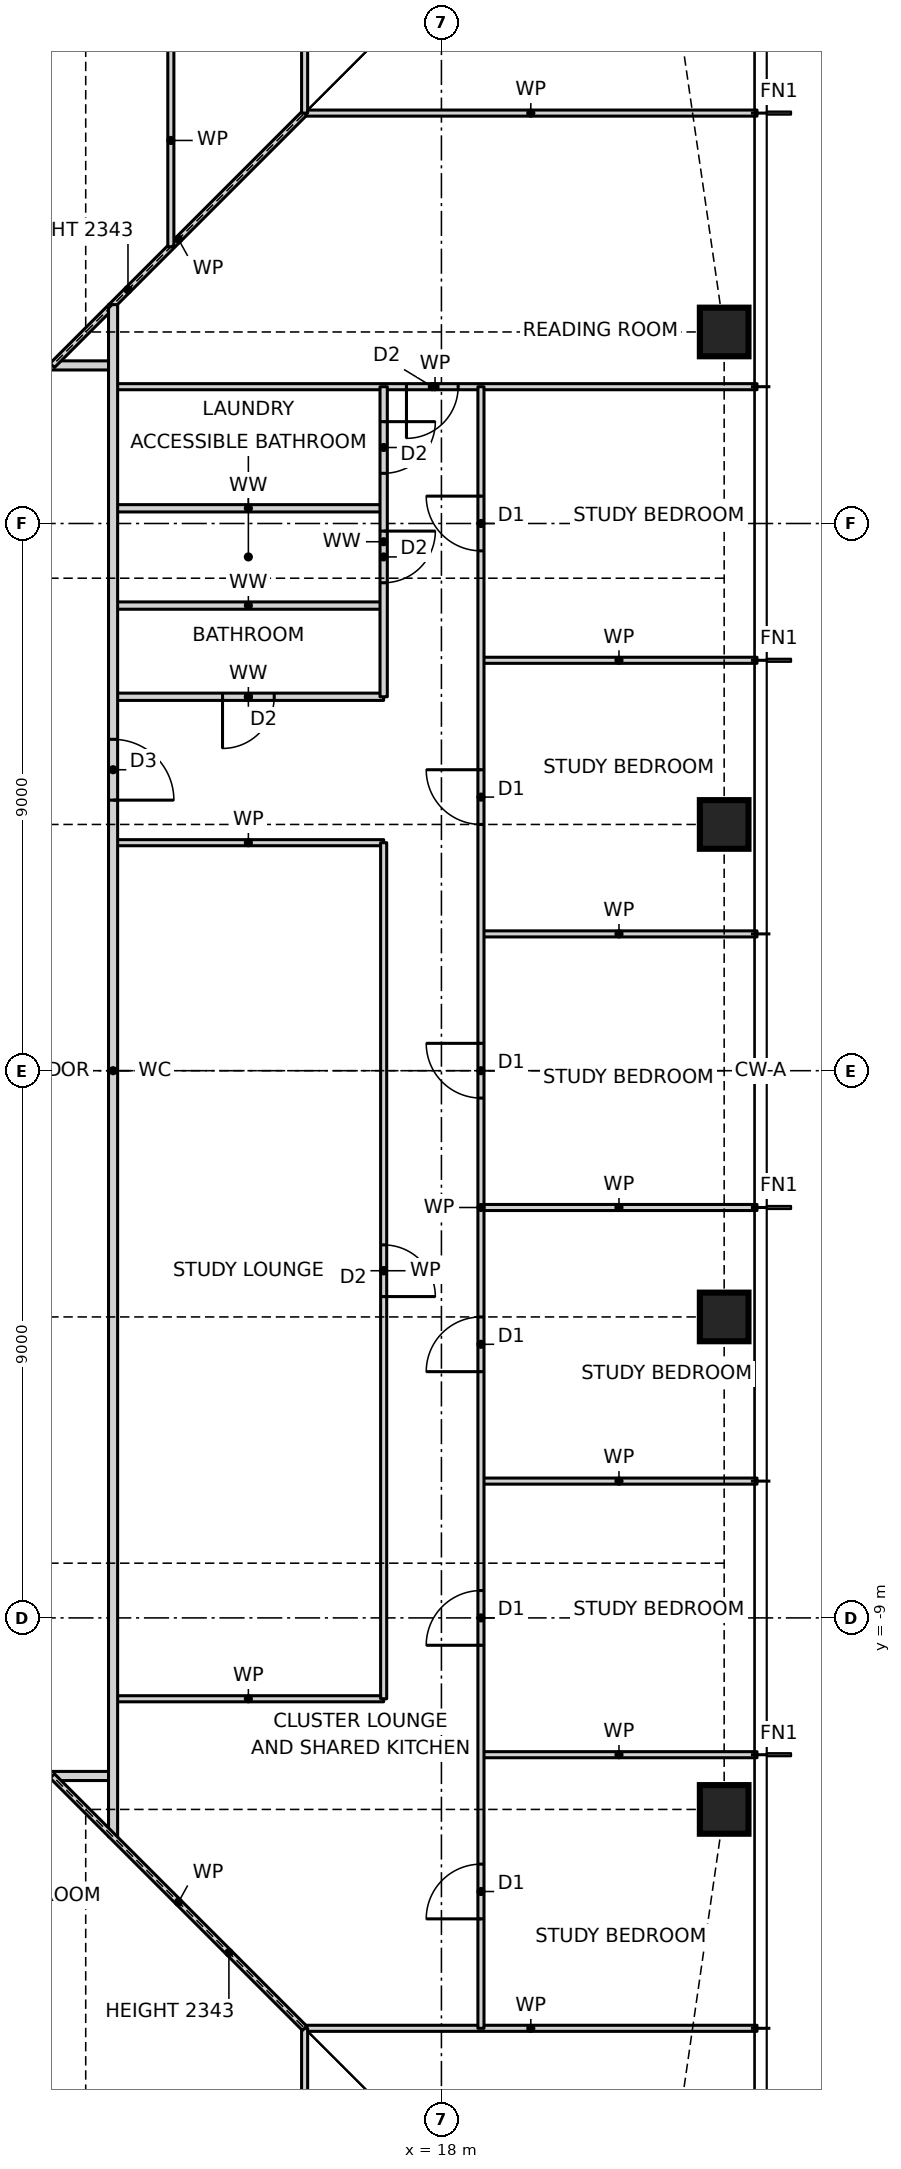
"""IFC4 building model, lengths in metres.
Left out: names, types, materials, properties, quantities, classifications, styles, units other than length and angle.
Written with IfcOpenShell. Run it as: python <this file> out.ifc"""

import sys

from ifc_helpers import new_model, si_unit, direction, frame, frame_2d, origin, origin_2d, place, context, subcontext, project, spatial, rectangle, hollow_rectangle, extrude, element, fill, save


model = new_model("IFC4")
c1 = context("Model", 3, precision=1e-05, world=origin(), true_north=direction((0.0, 1.0)))
c2 = subcontext(c1, "Body", "Model", "MODEL_VIEW")
j1 = project(units=[si_unit("LENGTHUNIT", "METRE"), si_unit("PLANEANGLEUNIT", "RADIAN")], contexts=[c1])
p1 = place(None, origin())
s1 = spatial("IfcSite", under=j1, at=p1, CompositionType="ELEMENT")
p2 = place(p1, origin())
s2 = spatial("IfcBuilding", under=s1, at=p2, CompositionType="ELEMENT")
p3 = place(p2, frame((0.0, 0.0, 67.5)))
s3 = spatial("IfcBuildingStorey", under=s2, at=p3, CompositionType="ELEMENT", Elevation=67.5)
for number, where, z_axis, x_axis in (
    (1, (22.65, -12.15, 0.0), (0.0, 0.0, 1.0), (1.0, 0.0, 0.0)),
    (2, (22.65, -4.05, 0.0), (0.0, 0.0, 1.0), (1.0, 0.0, 0.0)),
    (3, (22.65, 4.05, 0.0), (0.0, 0.0, 1.0), (1.0, 0.0, 0.0)),
    (4, (22.65, 12.15, 0.0), (0.0, 0.0, 1.0), (1.0, 0.0, 0.0)),
):
    element("IfcColumn", number, at=place(p3, frame(where, z_axis=z_axis, x_axis=x_axis)), inside=s3, PredefinedType="COLUMN", context=c2, shape_type="SweptSolid", body=[
        extrude(hollow_rectangle(XDim=0.8, YDim=0.8, WallThickness=0.09, at=origin_2d()), origin(), (0.0, 0.0, 1.0), 3.5),
    ])
p4 = place(p3, frame((15.75, -15.75, 0.0), z_axis=(0.0, 0.0, 1.0), x_axis=(1.0, 0.0, 0.0)))
e5 = element("IfcWall", 5, at=p4, inside=s3, PredefinedType="PARTITIONING", context=c2, shape_type="SweptSolid", body=[
    extrude(rectangle(XDim=7.44, YDim=0.1, at=frame_2d((3.72, 0.0))), origin(), (0.0, 0.0, 1.0), 3.27),
])
p5 = place(p3, frame((-11.6, -11.6, 0.0), z_axis=(0.0, 0.0, 1.0), x_axis=(1.0, 0.0, 0.0)))
e6 = element("IfcWall", 6, at=p5, inside=s3, PredefinedType="PARTITIONING", context=c2, shape_type="SweptSolid", body=[
    extrude(rectangle(XDim=24.2, YDim=0.15, at=frame_2d((12.1, 0.0))), origin(), (0.0, 0.0, 1.0), 3.27),
])
p6 = place(p5, frame((0.74, 0.0, 0.0)))
e7 = element("IfcOpeningElement", 7, at=p6, cuts=e6, PredefinedType="OPENING", context=c2, shape_type="SweptSolid", body=[
    extrude(rectangle(XDim=1.0, YDim=2.1, at=frame_2d((0.5, 1.05))), frame((0.0, 0.085, 0.0), z_axis=(0.0, -1.0, 0.0), x_axis=(1.0, 0.0, 0.0)), (0.0, 0.0, 1.0), 0.17),
])
p7 = place(p5, frame((21.025, 0.0, 0.0)))
e8 = element("IfcOpeningElement", 8, at=p7, cuts=e6, PredefinedType="OPENING", context=c2, shape_type="SweptSolid", body=[
    extrude(rectangle(XDim=1.0, YDim=2.1, at=frame_2d((0.5, 1.05))), frame((0.0, 0.085, 0.0), z_axis=(0.0, -1.0, 0.0), x_axis=(1.0, 0.0, 0.0)), (0.0, 0.0, 1.0), 0.17),
])
p8 = place(p3, frame((18.65, -11.25, 0.0), z_axis=(0.0, 0.0, 1.0), x_axis=(1.0, 0.0, 0.0)))
e9 = element("IfcWall", 9, at=p8, inside=s3, PredefinedType="PARTITIONING", context=c2, shape_type="SweptSolid", body=[
    extrude(rectangle(XDim=4.54, YDim=0.1, at=frame_2d((2.27, 0.0))), origin(), (0.0, 0.0, 1.0), 3.27),
])
p9 = place(p3, frame((12.6, -10.33, 0.0), z_axis=(0.0, 0.0, 1.0), x_axis=(1.0, 0.0, 0.0)))
e10 = element("IfcWall", 10, at=p9, inside=s3, PredefinedType="PARTITIONING", context=c2, shape_type="SweptSolid", body=[
    extrude(rectangle(XDim=4.45, YDim=0.1, at=frame_2d((2.225, 0.0))), origin(), (0.0, 0.0, 1.0), 3.27),
])
for number, where, z_axis, x_axis in (
    (11, (18.65, -6.75, 0.0), (0.0, 0.0, 1.0), (1.0, 0.0, 0.0)),
    (12, (18.65, -2.25, 0.0), (0.0, 0.0, 1.0), (1.0, 0.0, 0.0)),
    (13, (18.65, 2.25, 0.0), (0.0, 0.0, 1.0), (1.0, 0.0, 0.0)),
):
    element("IfcWall", number, at=place(p3, frame(where, z_axis=z_axis, x_axis=x_axis)), inside=s3, PredefinedType="PARTITIONING", context=c2, shape_type="SweptSolid", body=[
        extrude(rectangle(XDim=4.54, YDim=0.1, at=frame_2d((2.27, 0.0))), origin(), (0.0, 0.0, 1.0), 3.27),
    ])
p10 = place(p3, frame((12.6, 3.75, 0.0), z_axis=(0.0, 0.0, 1.0), x_axis=(1.0, 0.0, 0.0)))
e14 = element("IfcWall", 14, at=p10, inside=s3, PredefinedType="PARTITIONING", context=c2, shape_type="SweptSolid", body=[
    extrude(rectangle(XDim=4.45, YDim=0.1, at=frame_2d((2.225, 0.0))), origin(), (0.0, 0.0, 1.0), 3.27),
])
p11 = place(p3, frame((12.6, 6.15, 0.0), z_axis=(0.0, 0.0, 1.0), x_axis=(1.0, 0.0, 0.0)))
e15 = element("IfcWall", 15, at=p11, inside=s3, PredefinedType="PARTITIONING", context=c2, shape_type="SweptSolid", body=[
    extrude(rectangle(XDim=4.45, YDim=0.12, at=frame_2d((2.225, 0.0))), origin(), (0.0, 0.0, 1.0), 3.27),
])
p12 = place(p11, frame((1.8, 0.0, 0.0)))
e16 = element("IfcOpeningElement", 16, at=p12, cuts=e15, PredefinedType="OPENING", context=c2, shape_type="SweptSolid", body=[
    extrude(rectangle(XDim=0.85, YDim=2.1, at=frame_2d((0.425, 1.05))), frame((0.0, 0.07, 0.0), z_axis=(0.0, -1.0, 0.0), x_axis=(1.0, 0.0, 0.0)), (0.0, 0.0, 1.0), 0.14),
])
p13 = place(p3, frame((18.65, 6.75, 0.0), z_axis=(0.0, 0.0, 1.0), x_axis=(1.0, 0.0, 0.0)))
e17 = element("IfcWall", 17, at=p13, inside=s3, PredefinedType="PARTITIONING", context=c2, shape_type="SweptSolid", body=[
    extrude(rectangle(XDim=4.54, YDim=0.1, at=frame_2d((2.27, 0.0))), origin(), (0.0, 0.0, 1.0), 3.27),
])
for number, where, z_axis, x_axis in (
    (18, (12.6, 7.65, 0.0), (0.0, 0.0, 1.0), (1.0, 0.0, 0.0)),
    (19, (12.6, 9.25, 0.0), (0.0, 0.0, 1.0), (1.0, 0.0, 0.0)),
):
    element("IfcWall", number, at=place(p3, frame(where, z_axis=z_axis, x_axis=x_axis)), inside=s3, PredefinedType="PARTITIONING", context=c2, shape_type="SweptSolid", body=[
        extrude(rectangle(XDim=4.45, YDim=0.12, at=frame_2d((2.225, 0.0))), origin(), (0.0, 0.0, 1.0), 3.27),
    ])
p14 = place(p3, frame((12.6, 11.25, 0.0), z_axis=(0.0, 0.0, 1.0), x_axis=(1.0, 0.0, 0.0)))
e20 = element("IfcWall", 20, at=p14, inside=s3, PredefinedType="PARTITIONING", context=c2, shape_type="SweptSolid", body=[
    extrude(rectangle(XDim=10.59, YDim=0.1, at=frame_2d((5.295, 0.0))), origin(), (0.0, 0.0, 1.0), 3.27),
])
p15 = place(p14, frame((4.825, 0.0, 0.0)))
e21 = element("IfcOpeningElement", 21, at=p15, cuts=e20, PredefinedType="OPENING", context=c2, shape_type="SweptSolid", body=[
    extrude(rectangle(XDim=0.85, YDim=2.1, at=frame_2d((0.425, 1.05))), frame((0.0, 0.06, 0.0), z_axis=(0.0, -1.0, 0.0), x_axis=(1.0, 0.0, 0.0)), (0.0, 0.0, 1.0), 0.12),
])
p16 = place(p3, frame((-11.6, 11.6, 0.0), z_axis=(0.0, 0.0, 1.0), x_axis=(1.0, 0.0, 0.0)))
e22 = element("IfcWall", 22, at=p16, inside=s3, PredefinedType="PARTITIONING", context=c2, shape_type="SweptSolid", body=[
    extrude(rectangle(XDim=24.2, YDim=0.15, at=frame_2d((12.1, 0.0))), origin(), (0.0, 0.0, 1.0), 3.27),
])
p17 = place(p16, frame((7.95, 0.0, 0.0)))
e23 = element("IfcOpeningElement", 23, at=p17, cuts=e22, PredefinedType="OPENING", context=c2, shape_type="SweptSolid", body=[
    extrude(rectangle(XDim=1.0, YDim=2.1, at=frame_2d((0.5, 1.05))), frame((0.0, 0.085, 0.0), z_axis=(0.0, -1.0, 0.0), x_axis=(1.0, 0.0, 0.0)), (0.0, 0.0, 1.0), 0.17),
])
p18 = place(p16, frame((5.9, 0.0, 0.0)))
e24 = element("IfcOpeningElement", 24, at=p18, cuts=e22, PredefinedType="OPENING", context=c2, shape_type="SweptSolid", body=[
    extrude(rectangle(XDim=0.9, YDim=2.1, at=frame_2d((0.45, 1.05))), frame((0.0, 0.085, 0.0), z_axis=(0.0, -1.0, 0.0), x_axis=(1.0, 0.0, 0.0)), (0.0, 0.0, 1.0), 0.17),
])
p19 = place(p3, frame((15.75, 15.75, 0.0), z_axis=(0.0, 0.0, 1.0), x_axis=(1.0, 0.0, 0.0)))
e25 = element("IfcWall", 25, at=p19, inside=s3, PredefinedType="PARTITIONING", context=c2, shape_type="SweptSolid", body=[
    extrude(rectangle(XDim=7.44, YDim=0.1, at=frame_2d((3.72, 0.0))), origin(), (0.0, 0.0, 1.0), 3.27),
])
p20 = place(p3, frame((11.6, 11.6, 0.0), z_axis=(0.0, 0.0, 1.0), x_axis=(0.707106781187, 0.707106781187, 0.0)))
e26 = element("IfcWall", 26, at=p20, inside=s3, PredefinedType="PARTITIONING", context=c2, shape_type="SweptSolid", body=[
    extrude(rectangle(XDim=5.869, YDim=0.1, at=frame_2d((2.935, 0.0))), origin(), (0.0, 0.0, 1.0), 2.343),
])
p21 = place(p3, frame((18.65, -15.75, 0.0), z_axis=(0.0, 0.0, 1.0), x_axis=(0.0, 1.0, 0.0)))
e27 = element("IfcWall", 27, at=p21, inside=s3, PredefinedType="PARTITIONING", context=c2, shape_type="SweptSolid", body=[
    extrude(rectangle(XDim=27.0, YDim=0.1, at=frame_2d((13.5, 0.0))), origin(), (0.0, 0.0, 1.0), 3.27),
])
p22 = place(p21, frame((1.8, 0.0, 0.0)))
e28 = element("IfcOpeningElement", 28, at=p22, cuts=e27, PredefinedType="OPENING", context=c2, shape_type="SweptSolid", body=[
    extrude(rectangle(XDim=0.9, YDim=2.1, at=frame_2d((0.45, 1.05))), frame((0.0, 0.06, 0.0), z_axis=(0.0, -1.0, 0.0), x_axis=(1.0, 0.0, 0.0)), (0.0, 0.0, 1.0), 0.12),
])
p23 = place(p21, frame((6.3, 0.0, 0.0)))
e29 = element("IfcOpeningElement", 29, at=p23, cuts=e27, PredefinedType="OPENING", context=c2, shape_type="SweptSolid", body=[
    extrude(rectangle(XDim=0.9, YDim=2.1, at=frame_2d((0.45, 1.05))), frame((0.0, 0.06, 0.0), z_axis=(0.0, -1.0, 0.0), x_axis=(1.0, 0.0, 0.0)), (0.0, 0.0, 1.0), 0.12),
])
p24 = place(p21, frame((10.8, 0.0, 0.0)))
e30 = element("IfcOpeningElement", 30, at=p24, cuts=e27, PredefinedType="OPENING", context=c2, shape_type="SweptSolid", body=[
    extrude(rectangle(XDim=0.9, YDim=2.1, at=frame_2d((0.45, 1.05))), frame((0.0, 0.06, 0.0), z_axis=(0.0, -1.0, 0.0), x_axis=(1.0, 0.0, 0.0)), (0.0, 0.0, 1.0), 0.12),
])
p25 = place(p21, frame((15.3, 0.0, 0.0)))
e31 = element("IfcOpeningElement", 31, at=p25, cuts=e27, PredefinedType="OPENING", context=c2, shape_type="SweptSolid", body=[
    extrude(rectangle(XDim=0.9, YDim=2.1, at=frame_2d((0.45, 1.05))), frame((0.0, 0.06, 0.0), z_axis=(0.0, -1.0, 0.0), x_axis=(1.0, 0.0, 0.0)), (0.0, 0.0, 1.0), 0.12),
])
p26 = place(p21, frame((19.8, 0.0, 0.0)))
e32 = element("IfcOpeningElement", 32, at=p26, cuts=e27, PredefinedType="OPENING", context=c2, shape_type="SweptSolid", body=[
    extrude(rectangle(XDim=0.9, YDim=2.1, at=frame_2d((0.45, 1.05))), frame((0.0, 0.06, 0.0), z_axis=(0.0, -1.0, 0.0), x_axis=(1.0, 0.0, 0.0)), (0.0, 0.0, 1.0), 0.12),
])
p27 = place(p21, frame((24.3, 0.0, 0.0)))
e33 = element("IfcOpeningElement", 33, at=p27, cuts=e27, PredefinedType="OPENING", context=c2, shape_type="SweptSolid", body=[
    extrude(rectangle(XDim=0.9, YDim=2.1, at=frame_2d((0.45, 1.05))), frame((0.0, 0.06, 0.0), z_axis=(0.0, -1.0, 0.0), x_axis=(1.0, 0.0, 0.0)), (0.0, 0.0, 1.0), 0.12),
])
p28 = place(p3, frame((17.05, -10.33, 0.0), z_axis=(0.0, 0.0, 1.0), x_axis=(0.0, 1.0, 0.0)))
e34 = element("IfcWall", 34, at=p28, inside=s3, PredefinedType="PARTITIONING", context=c2, shape_type="SweptSolid", body=[
    extrude(rectangle(XDim=14.08, YDim=0.1, at=frame_2d((7.04, 0.0))), origin(), (0.0, 0.0, 1.0), 3.27),
])
p29 = place(p28, frame((6.615, 0.0, 0.0)))
e35 = element("IfcOpeningElement", 35, at=p29, cuts=e34, PredefinedType="OPENING", context=c2, shape_type="SweptSolid", body=[
    extrude(rectangle(XDim=0.85, YDim=2.1, at=frame_2d((0.425, 1.05))), frame((0.0, 0.06, 0.0), z_axis=(0.0, -1.0, 0.0), x_axis=(1.0, 0.0, 0.0)), (0.0, 0.0, 1.0), 0.12),
])
p30 = place(p3, frame((17.05, 6.15, 0.0), z_axis=(0.0, 0.0, 1.0), x_axis=(0.0, 1.0, 0.0)))
e36 = element("IfcWall", 36, at=p30, inside=s3, PredefinedType="PARTITIONING", context=c2, shape_type="SweptSolid", body=[
    extrude(rectangle(XDim=5.1, YDim=0.12, at=frame_2d((2.55, 0.0))), origin(), (0.0, 0.0, 1.0), 3.27),
])
p31 = place(p30, frame((1.875, 0.0, 0.0)))
e37 = element("IfcOpeningElement", 37, at=p31, cuts=e36, PredefinedType="OPENING", context=c2, shape_type="SweptSolid", body=[
    extrude(rectangle(XDim=0.85, YDim=2.1, at=frame_2d((0.425, 1.05))), frame((0.0, 0.07, 0.0), z_axis=(0.0, -1.0, 0.0), x_axis=(1.0, 0.0, 0.0)), (0.0, 0.0, 1.0), 0.14),
])
p32 = place(p30, frame((3.675, 0.0, 0.0)))
e38 = element("IfcOpeningElement", 38, at=p32, cuts=e36, PredefinedType="OPENING", context=c2, shape_type="SweptSolid", body=[
    extrude(rectangle(XDim=0.85, YDim=2.1, at=frame_2d((0.425, 1.05))), frame((0.0, 0.07, 0.0), z_axis=(0.0, -1.0, 0.0), x_axis=(1.0, 0.0, 0.0)), (0.0, 0.0, 1.0), 0.14),
])
p33 = place(p3, frame((15.75, -23.19, 0.0), z_axis=(0.0, 0.0, 1.0), x_axis=(0.0, 1.0, 0.0)))
e39 = element("IfcWall", 39, at=p33, inside=s3, PredefinedType="PARTITIONING", context=c2, shape_type="SweptSolid", body=[
    extrude(rectangle(XDim=7.44, YDim=0.1, at=frame_2d((3.72, 0.0))), origin(), (0.0, 0.0, 1.0), 3.27),
])
p34 = place(p33, frame((4.915, 0.0, 0.0)))
e40 = element("IfcOpeningElement", 40, at=p34, cuts=e39, PredefinedType="OPENING", context=c2, shape_type="SweptSolid", body=[
    extrude(rectangle(XDim=0.85, YDim=2.1, at=frame_2d((0.425, 1.05))), frame((0.0, 0.06, 0.0), z_axis=(0.0, -1.0, 0.0), x_axis=(1.0, 0.0, 0.0)), (0.0, 0.0, 1.0), 0.12),
])
p35 = place(p3, frame((15.75, 15.75, 0.0), z_axis=(0.0, 0.0, 1.0), x_axis=(0.0, 1.0, 0.0)))
e41 = element("IfcWall", 41, at=p35, inside=s3, PredefinedType="PARTITIONING", context=c2, shape_type="SweptSolid", body=[
    extrude(rectangle(XDim=7.44, YDim=0.1, at=frame_2d((3.72, 0.0))), origin(), (0.0, 0.0, 1.0), 3.27),
])
p36 = place(p35, frame((1.675, 0.0, 0.0)))
e42 = element("IfcOpeningElement", 42, at=p36, cuts=e41, PredefinedType="OPENING", context=c2, shape_type="SweptSolid", body=[
    extrude(rectangle(XDim=0.85, YDim=2.1, at=frame_2d((0.425, 1.05))), frame((0.0, 0.06, 0.0), z_axis=(0.0, -1.0, 0.0), x_axis=(1.0, 0.0, 0.0)), (0.0, 0.0, 1.0), 0.12),
])
p37 = place(p3, frame((13.55, 13.55, 0.0), z_axis=(0.0, 0.0, 1.0), x_axis=(0.0, 1.0, 0.0)))
e43 = element("IfcWall", 43, at=p37, inside=s3, PredefinedType="PARTITIONING", context=c2, shape_type="SweptSolid", body=[
    extrude(rectangle(XDim=3.5, YDim=0.1, at=frame_2d((1.75, 0.0))), origin(), (0.0, 0.0, 1.0), 3.27),
])
p38 = place(p3, frame((12.6, -12.6, 0.0), z_axis=(0.0, 0.0, 1.0), x_axis=(0.0, 1.0, 0.0)))
e44 = element("IfcWall", 44, at=p38, inside=s3, PredefinedType="PARTITIONING", context=c2, shape_type="SweptSolid", body=[
    extrude(rectangle(XDim=25.2, YDim=0.15, at=frame_2d((12.6, 0.0))), origin(), (0.0, 0.0, 1.0), 3.27),
])
p39 = place(p38, frame((17.05, 0.0, 0.0)))
e45 = element("IfcOpeningElement", 45, at=p39, cuts=e44, PredefinedType="OPENING", context=c2, shape_type="SweptSolid", body=[
    extrude(rectangle(XDim=1.0, YDim=2.1, at=frame_2d((0.5, 1.05))), frame((0.0, 0.085, 0.0), z_axis=(0.0, -1.0, 0.0), x_axis=(1.0, 0.0, 0.0)), (0.0, 0.0, 1.0), 0.17),
])
p40 = place(p3, frame((15.75, -15.75, 0.0), z_axis=(0.0, 0.0, 1.0), x_axis=(-0.707106781187, 0.707106781187, 0.0)))
e46 = element("IfcWall", 46, at=p40, inside=s3, PredefinedType="PARTITIONING", context=c2, shape_type="SweptSolid", body=[
    extrude(rectangle(XDim=5.869, YDim=0.1, at=frame_2d((2.935, 0.0))), origin(), (0.0, 0.0, 1.0), 2.343),
])
p41 = place(p22, origin())
e47 = element("IfcDoor", 47, at=p41, inside=s3, OperationType="SINGLE_SWING_LEFT", PredefinedType="DOOR", context=c2, shape_type="SweptSolid", body=[
    extrude(rectangle(XDim=0.9, YDim=2.1, at=frame_2d((0.45, 1.05))), frame((0.0, 0.025, 0.0), z_axis=(0.0, -1.0, 0.0), x_axis=(1.0, 0.0, 0.0)), (0.0, 0.0, 1.0), 0.05),
])
fill(e28, e47)
p42 = place(p23, origin())
e48 = element("IfcDoor", 48, at=p42, inside=s3, OperationType="SINGLE_SWING_LEFT", PredefinedType="DOOR", context=c2, shape_type="SweptSolid", body=[
    extrude(rectangle(XDim=0.9, YDim=2.1, at=frame_2d((0.45, 1.05))), frame((0.0, 0.025, 0.0), z_axis=(0.0, -1.0, 0.0), x_axis=(1.0, 0.0, 0.0)), (0.0, 0.0, 1.0), 0.05),
])
fill(e29, e48)
p43 = place(p24, origin())
e49 = element("IfcDoor", 49, at=p43, inside=s3, OperationType="SINGLE_SWING_LEFT", PredefinedType="DOOR", context=c2, shape_type="SweptSolid", body=[
    extrude(rectangle(XDim=0.9, YDim=2.1, at=frame_2d((0.45, 1.05))), frame((0.0, 0.025, 0.0), z_axis=(0.0, -1.0, 0.0), x_axis=(1.0, 0.0, 0.0)), (0.0, 0.0, 1.0), 0.05),
])
fill(e30, e49)
p44 = place(p25, origin())
e50 = element("IfcDoor", 50, at=p44, inside=s3, OperationType="SINGLE_SWING_RIGHT", PredefinedType="DOOR", context=c2, shape_type="SweptSolid", body=[
    extrude(rectangle(XDim=0.9, YDim=2.1, at=frame_2d((0.45, 1.05))), frame((0.0, 0.025, 0.0), z_axis=(0.0, -1.0, 0.0), x_axis=(1.0, 0.0, 0.0)), (0.0, 0.0, 1.0), 0.05),
])
fill(e31, e50)
p45 = place(p26, origin())
e51 = element("IfcDoor", 51, at=p45, inside=s3, OperationType="SINGLE_SWING_RIGHT", PredefinedType="DOOR", context=c2, shape_type="SweptSolid", body=[
    extrude(rectangle(XDim=0.9, YDim=2.1, at=frame_2d((0.45, 1.05))), frame((0.0, 0.025, 0.0), z_axis=(0.0, -1.0, 0.0), x_axis=(1.0, 0.0, 0.0)), (0.0, 0.0, 1.0), 0.05),
])
fill(e32, e51)
p46 = place(p27, origin())
e52 = element("IfcDoor", 52, at=p46, inside=s3, OperationType="SINGLE_SWING_RIGHT", PredefinedType="DOOR", context=c2, shape_type="SweptSolid", body=[
    extrude(rectangle(XDim=0.9, YDim=2.1, at=frame_2d((0.45, 1.05))), frame((0.0, 0.025, 0.0), z_axis=(0.0, -1.0, 0.0), x_axis=(1.0, 0.0, 0.0)), (0.0, 0.0, 1.0), 0.05),
])
fill(e33, e52)
p47 = place(p39, frame((1.0, 0.0, 0.0), z_axis=(0.0, 0.0, 1.0), x_axis=(-1.0, 0.0, 0.0)))
e53 = element("IfcDoor", 53, at=p47, inside=s3, OperationType="SINGLE_SWING_RIGHT", PredefinedType="DOOR", context=c2, shape_type="SweptSolid", body=[
    extrude(rectangle(XDim=1.0, YDim=2.1, at=frame_2d((0.5, 1.05))), frame((0.0, 0.025, 0.0), z_axis=(0.0, -1.0, 0.0), x_axis=(1.0, 0.0, 0.0)), (0.0, 0.0, 1.0), 0.05),
])
fill(e45, e53)
p48 = place(p29, frame((0.85, 0.0, 0.0), z_axis=(0.0, 0.0, 1.0), x_axis=(-1.0, 0.0, 0.0)))
e54 = element("IfcDoor", 54, at=p48, inside=s3, OperationType="SINGLE_SWING_RIGHT", PredefinedType="DOOR", context=c2, shape_type="SweptSolid", body=[
    extrude(rectangle(XDim=0.85, YDim=2.1, at=frame_2d((0.425, 1.05))), frame((0.0, 0.025, 0.0), z_axis=(0.0, -1.0, 0.0), x_axis=(1.0, 0.0, 0.0)), (0.0, 0.0, 1.0), 0.05),
])
fill(e35, e54)
p49 = place(p12, frame((0.85, 0.0, 0.0), z_axis=(0.0, 0.0, 1.0), x_axis=(-1.0, 0.0, 0.0)))
e55 = element("IfcDoor", 55, at=p49, inside=s3, OperationType="SINGLE_SWING_RIGHT", PredefinedType="DOOR", context=c2, shape_type="SweptSolid", body=[
    extrude(rectangle(XDim=0.85, YDim=2.1, at=frame_2d((0.425, 1.05))), frame((0.0, 0.025, 0.0), z_axis=(0.0, -1.0, 0.0), x_axis=(1.0, 0.0, 0.0)), (0.0, 0.0, 1.0), 0.05),
])
fill(e16, e55)
p50 = place(p31, frame((0.85, 0.0, 0.0), z_axis=(0.0, 0.0, 1.0), x_axis=(-1.0, 0.0, 0.0)))
e56 = element("IfcDoor", 56, at=p50, inside=s3, OperationType="SINGLE_SWING_LEFT", PredefinedType="DOOR", context=c2, shape_type="SweptSolid", body=[
    extrude(rectangle(XDim=0.85, YDim=2.1, at=frame_2d((0.425, 1.05))), frame((0.0, 0.025, 0.0), z_axis=(0.0, -1.0, 0.0), x_axis=(1.0, 0.0, 0.0)), (0.0, 0.0, 1.0), 0.05),
])
fill(e37, e56)
p51 = place(p32, frame((0.85, 0.0, 0.0), z_axis=(0.0, 0.0, 1.0), x_axis=(-1.0, 0.0, 0.0)))
e57 = element("IfcDoor", 57, at=p51, inside=s3, OperationType="SINGLE_SWING_LEFT", PredefinedType="DOOR", context=c2, shape_type="SweptSolid", body=[
    extrude(rectangle(XDim=0.85, YDim=2.1, at=frame_2d((0.425, 1.05))), frame((0.0, 0.025, 0.0), z_axis=(0.0, -1.0, 0.0), x_axis=(1.0, 0.0, 0.0)), (0.0, 0.0, 1.0), 0.05),
])
fill(e38, e57)
p52 = place(p15, frame((0.85, 0.0, 0.0), z_axis=(0.0, 0.0, 1.0), x_axis=(-1.0, 0.0, 0.0)))
e58 = element("IfcDoor", 58, at=p52, inside=s3, OperationType="SINGLE_SWING_RIGHT", PredefinedType="DOOR", context=c2, shape_type="SweptSolid", body=[
    extrude(rectangle(XDim=0.85, YDim=2.1, at=frame_2d((0.425, 1.05))), frame((0.0, 0.025, 0.0), z_axis=(0.0, -1.0, 0.0), x_axis=(1.0, 0.0, 0.0)), (0.0, 0.0, 1.0), 0.05),
])
fill(e21, e58)
save(model, sys.argv[1])
